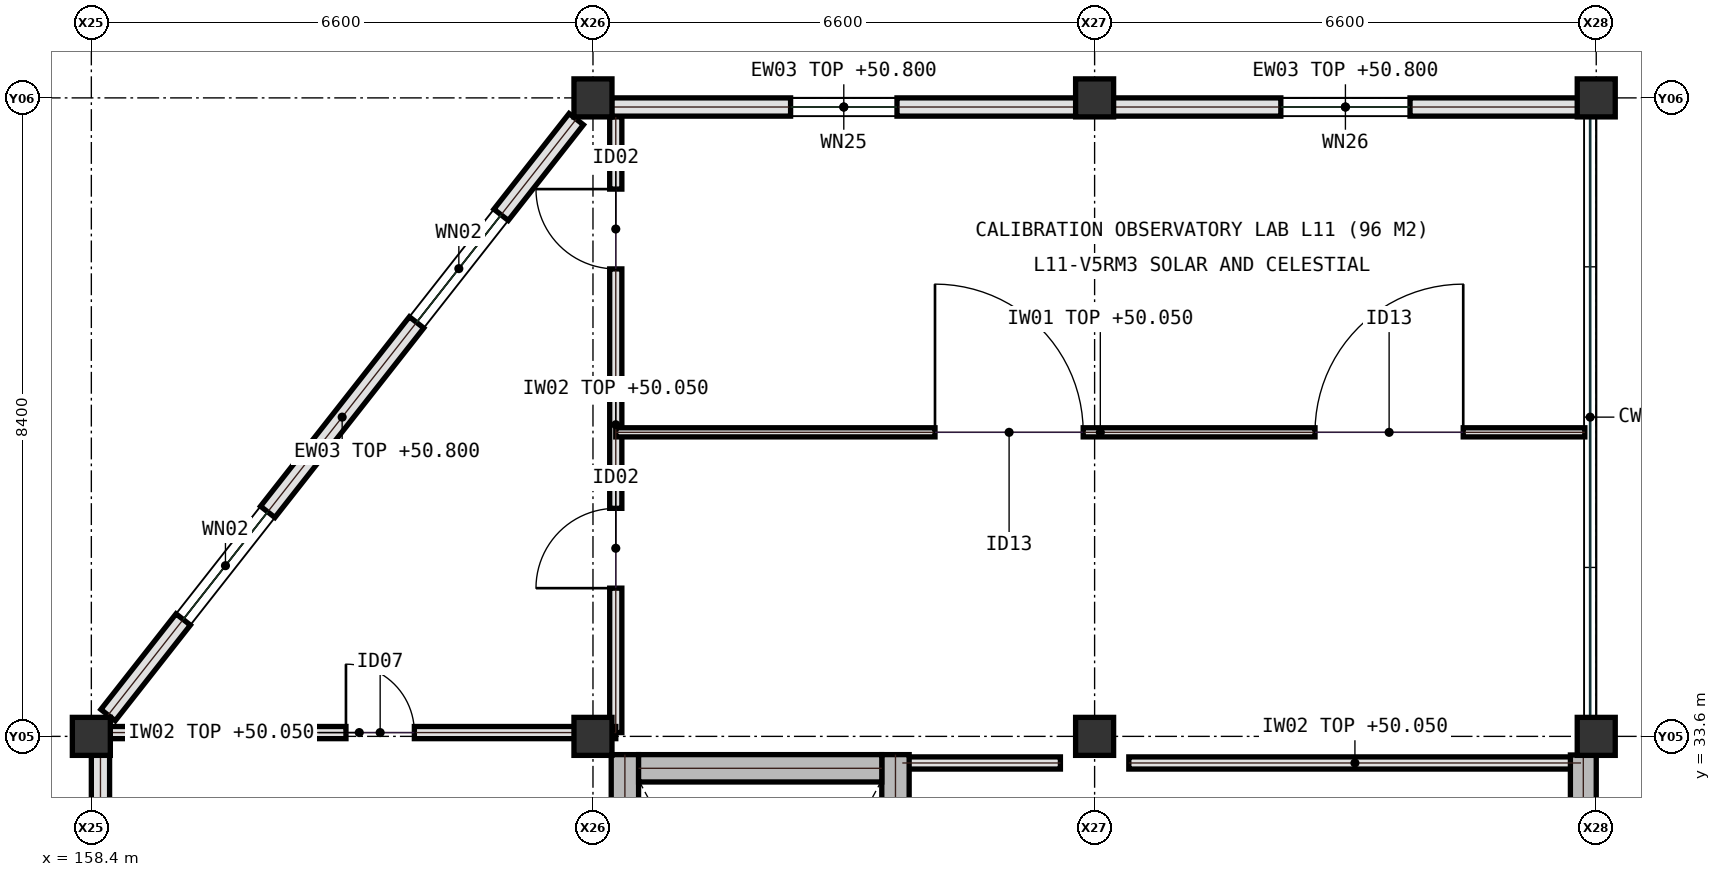
"""IFC4 building model, lengths in metres.
Left out: names, types, materials, properties, quantities, classifications, styles, units other than length and angle.
Written with IfcOpenShell. Run it as: python <this file> out.ifc"""

import sys

from ifc_helpers import new_model, si_unit, direction, frame, frame_2d, origin, origin_2d, place, context, subcontext, project, spatial, rectangle, extrude, element, fill, save


model = new_model("IFC4")
c1 = context("Model", 3, precision=1e-05, world=origin(), true_north=direction((0.0, 1.0)))
c2 = subcontext(c1, "Body", "Model", "MODEL_VIEW")
j1 = project(units=[si_unit("LENGTHUNIT", "METRE"), si_unit("PLANEANGLEUNIT", "RADIAN")], contexts=[c1])
p1 = place(None, origin())
s1 = spatial("IfcSite", under=j1, at=p1, CompositionType="ELEMENT")
p2 = place(p1, origin())
s2 = spatial("IfcBuilding", under=s1, at=p2, CompositionType="ELEMENT")
p3 = place(p2, frame((0.0, 0.0, 47.1)))
s3 = spatial("IfcBuildingStorey", under=s2, at=p3, CompositionType="ELEMENT", Elevation=47.1)
p4 = place(p3, frame((158.4, 33.6, 0.0), z_axis=(0.0, 0.0, 1.0), x_axis=(1.0, 0.0, 0.0)))
e1 = element("IfcColumn", 1, at=p4, inside=s3, PredefinedType="COLUMN", context=c2, shape_type="SweptSolid", body=[
    extrude(rectangle(XDim=0.5, YDim=0.5, at=origin_2d()), origin(), (0.0, 0.0, 1.0), 3.9),
])
p5 = place(p3, frame((165.0, 33.6, 0.0), z_axis=(0.0, 0.0, 1.0), x_axis=(1.0, 0.0, 0.0)))
e2 = element("IfcColumn", 2, at=p5, inside=s3, PredefinedType="COLUMN", context=c2, shape_type="SweptSolid", body=[
    extrude(rectangle(XDim=0.5, YDim=0.5, at=origin_2d()), origin(), (0.0, 0.0, 1.0), 4.54),
])
for number, where, z_axis, x_axis in (
    (3, (165.0, 42.0, 0.0), (0.0, 0.0, 1.0), (1.0, 0.0, 0.0)),
    (4, (171.6, 33.6, 0.0), (0.0, 0.0, 1.0), (1.0, 0.0, 0.0)),
    (5, (171.6, 42.0, 0.0), (0.0, 0.0, 1.0), (1.0, 0.0, 0.0)),
    (6, (178.2, 33.6, 0.0), (0.0, 0.0, 1.0), (1.0, 0.0, 0.0)),
    (7, (178.2, 42.0, 0.0), (0.0, 0.0, 1.0), (1.0, 0.0, 0.0)),
):
    element("IfcColumn", number, at=place(p3, frame(where, z_axis=z_axis, x_axis=x_axis)), inside=s3, PredefinedType="COLUMN", context=c2, shape_type="SweptSolid", body=[
        extrude(rectangle(XDim=0.5, YDim=0.5, at=origin_2d()), origin(), (0.0, 0.0, 1.0), 3.9),
    ])
p6 = place(p3, frame((165.3, 33.65, 0.0), z_axis=(0.0, 0.0, 1.0), x_axis=(0.0, 1.0, 0.0)))
e8 = element("IfcWall", 8, at=p6, inside=s3, PredefinedType="PARTITIONING", context=c2, shape_type="SweptSolid", body=[
    extrude(rectangle(XDim=8.1, YDim=0.16, at=frame_2d((4.05, 0.0))), origin(), (0.0, 0.0, 1.0), 2.95),
])
p7 = place(p6, frame((1.9, 0.0, 0.0)))
e9 = element("IfcOpeningElement", 9, at=p7, cuts=e8, PredefinedType="OPENING", context=c2, shape_type="SweptSolid", body=[
    extrude(rectangle(XDim=1.05, YDim=2.15, at=frame_2d((0.525, 1.075))), frame((0.0, 0.09, 0.0), z_axis=(0.0, -1.0, 0.0), x_axis=(1.0, 0.0, 0.0)), (0.0, 0.0, 1.0), 0.18),
])
p8 = place(p6, frame((6.1, 0.0, 0.0)))
e10 = element("IfcOpeningElement", 10, at=p8, cuts=e8, PredefinedType="OPENING", context=c2, shape_type="SweptSolid", body=[
    extrude(rectangle(XDim=1.05, YDim=2.15, at=frame_2d((0.525, 1.075))), frame((0.0, 0.09, 0.0), z_axis=(0.0, -1.0, 0.0), x_axis=(1.0, 0.0, 0.0)), (0.0, 0.0, 1.0), 0.18),
])
p9 = place(p3, frame((158.55, 33.65, 0.0), z_axis=(0.0, 0.0, 1.0), x_axis=(1.0, 0.0, 0.0)))
e11 = element("IfcWall", 11, at=p9, inside=s3, PredefinedType="PARTITIONING", context=c2, shape_type="SweptSolid", body=[
    extrude(rectangle(XDim=6.75, YDim=0.16, at=frame_2d((3.375, 0.0))), origin(), (0.0, 0.0, 1.0), 2.95),
])
p10 = place(p9, frame((3.2, 0.0, 0.0)))
e12 = element("IfcOpeningElement", 12, at=p10, cuts=e11, PredefinedType="OPENING", context=c2, shape_type="SweptSolid", body=[
    extrude(rectangle(XDim=0.9, YDim=2.1, at=frame_2d((0.45, 1.05))), frame((0.0, 0.09, 0.0), z_axis=(0.0, -1.0, 0.0), x_axis=(1.0, 0.0, 0.0)), (0.0, 0.0, 1.0), 0.18),
])
p11 = place(p3, frame((165.3, 37.6, 0.0), z_axis=(0.0, 0.0, 1.0), x_axis=(1.0, 0.0, 0.0)))
e13 = element("IfcWall", 13, at=p11, inside=s3, PredefinedType="PARTITIONING", context=c2, shape_type="SweptSolid", body=[
    extrude(rectangle(XDim=12.75, YDim=0.12, at=frame_2d((6.375, 0.0))), origin(), (0.0, 0.0, 1.0), 2.95),
])
p12 = place(p11, frame((4.2, 0.0, 0.0)))
e14 = element("IfcOpeningElement", 14, at=p12, cuts=e13, PredefinedType="OPENING", context=c2, shape_type="SweptSolid", body=[
    extrude(rectangle(XDim=1.95, YDim=2.35, at=frame_2d((0.975, 1.175))), frame((0.0, 0.07, 0.0), z_axis=(0.0, -1.0, 0.0), x_axis=(1.0, 0.0, 0.0)), (0.0, 0.0, 1.0), 0.14),
])
p13 = place(p11, frame((9.2, 0.0, 0.0)))
e15 = element("IfcOpeningElement", 15, at=p13, cuts=e13, PredefinedType="OPENING", context=c2, shape_type="SweptSolid", body=[
    extrude(rectangle(XDim=1.95, YDim=2.35, at=frame_2d((0.975, 1.175))), frame((0.0, 0.07, 0.0), z_axis=(0.0, -1.0, 0.0), x_axis=(1.0, 0.0, 0.0)), (0.0, 0.0, 1.0), 0.14),
])
p14 = place(p3, frame((169.07, 33.25, 0.0), z_axis=(0.0, 0.0, 1.0), x_axis=(1.0, 0.0, 0.0)))
e16 = element("IfcWall", 16, at=p14, inside=s3, PredefinedType="PARTITIONING", context=c2, shape_type="SweptSolid", body=[
    extrude(rectangle(XDim=2.08, YDim=0.16, at=frame_2d((1.04, 0.0))), origin(), (0.0, 0.0, 1.0), 2.95),
])
p15 = place(p3, frame((172.05, 33.25, 0.0), z_axis=(0.0, 0.0, 1.0), x_axis=(1.0, 0.0, 0.0)))
e17 = element("IfcWall", 17, at=p15, inside=s3, PredefinedType="PARTITIONING", context=c2, shape_type="SweptSolid", body=[
    extrude(rectangle(XDim=5.95, YDim=0.16, at=frame_2d((2.975, 0.0))), origin(), (0.0, 0.0, 1.0), 2.95),
])
p16 = place(p3, frame((158.52, 33.355, 0.0), z_axis=(0.0, 0.0, 1.0), x_axis=(0.0, -1.0, 0.0)))
e18 = element("IfcWall", 18, at=p16, inside=s3, PredefinedType="SOLIDWALL", context=c2, shape_type="SweptSolid", body=[
    extrude(rectangle(XDim=7.91, YDim=0.24, at=frame_2d((3.955, 0.0))), origin(), (0.0, 0.0, 1.0), 3.7),
])
p17 = place(p16, frame((3.155, 0.0, 0.95)))
e19 = element("IfcOpeningElement", 19, at=p17, cuts=e18, PredefinedType="OPENING", context=c2, shape_type="SweptSolid", body=[
    extrude(rectangle(XDim=1.6, YDim=1.85, at=frame_2d((0.8, 0.925))), frame((0.0, 0.13, 0.0), z_axis=(0.0, -1.0, 0.0), x_axis=(1.0, 0.0, 0.0)), (0.0, 0.0, 1.0), 0.26),
])
p18 = place(p3, frame((171.355, 41.88, 0.0), z_axis=(0.0, 0.0, 1.0), x_axis=(-1.0, 0.0, 0.0)))
e20 = element("IfcWall", 20, at=p18, inside=s3, PredefinedType="SOLIDWALL", context=c2, shape_type="SweptSolid", body=[
    extrude(rectangle(XDim=6.11, YDim=0.24, at=frame_2d((3.055, 0.0))), origin(), (0.0, 0.0, 1.0), 3.7),
])
p19 = place(p18, frame((2.355, 0.0, 0.95)))
e21 = element("IfcOpeningElement", 21, at=p19, cuts=e20, PredefinedType="OPENING", context=c2, shape_type="SweptSolid", body=[
    extrude(rectangle(XDim=1.4, YDim=1.95, at=frame_2d((0.7, 0.975))), frame((0.0, 0.13, 0.0), z_axis=(0.0, -1.0, 0.0), x_axis=(1.0, 0.0, 0.0)), (0.0, 0.0, 1.0), 0.26),
])
p20 = place(p3, frame((178.03, 25.445, 0.0), z_axis=(0.0, 0.0, 1.0), x_axis=(0.0, 1.0, 0.0)))
e22 = element("IfcWall", 22, at=p20, inside=s3, PredefinedType="SHEAR", context=c2, shape_type="SweptSolid", body=[
    extrude(rectangle(XDim=7.91, YDim=0.34, at=frame_2d((3.955, 0.0))), origin(), (0.0, 0.0, 1.0), 3.7),
])
p21 = place(p3, frame((177.955, 41.88, 0.0), z_axis=(0.0, 0.0, 1.0), x_axis=(-1.0, 0.0, 0.0)))
e23 = element("IfcWall", 23, at=p21, inside=s3, PredefinedType="SOLIDWALL", context=c2, shape_type="SweptSolid", body=[
    extrude(rectangle(XDim=6.11, YDim=0.24, at=frame_2d((3.055, 0.0))), origin(), (0.0, 0.0, 1.0), 3.7),
])
p22 = place(p21, frame((2.205, 0.0, 0.95)))
e24 = element("IfcOpeningElement", 24, at=p22, cuts=e23, PredefinedType="OPENING", context=c2, shape_type="SweptSolid", body=[
    extrude(rectangle(XDim=1.7, YDim=1.95, at=frame_2d((0.85, 0.975))), frame((0.0, 0.13, 0.0), z_axis=(0.0, -1.0, 0.0), x_axis=(1.0, 0.0, 0.0)), (0.0, 0.0, 1.0), 0.26),
])
p23 = place(p3, frame((158.62, 33.88, 0.0), z_axis=(0.0, 0.0, 1.0), x_axis=(0.617811819191, 0.786325985878, 0.0)))
e25 = element("IfcWall", 25, at=p23, inside=s3, PredefinedType="SOLIDWALL", context=c2, shape_type="SweptSolid", body=[
    extrude(rectangle(XDim=9.97, YDim=0.24, at=frame_2d((4.985, 0.0))), origin(), (0.0, 0.0, 1.0), 3.7),
])
p24 = place(p23, frame((1.6, 0.0, 0.95)))
e26 = element("IfcOpeningElement", 26, at=p24, cuts=e25, PredefinedType="OPENING", context=c2, shape_type="SweptSolid", body=[
    extrude(rectangle(XDim=1.8, YDim=1.6, at=frame_2d((0.9, 0.8))), frame((0.0, 0.13, 0.0), z_axis=(0.0, -1.0, 0.0), x_axis=(1.0, 0.0, 0.0)), (0.0, 0.0, 1.0), 0.26),
])
p25 = place(p23, frame((6.57, 0.0, 0.95)))
e27 = element("IfcOpeningElement", 27, at=p25, cuts=e25, PredefinedType="OPENING", context=c2, shape_type="SweptSolid", body=[
    extrude(rectangle(XDim=1.8, YDim=1.6, at=frame_2d((0.9, 0.8))), frame((0.0, 0.13, 0.0), z_axis=(0.0, -1.0, 0.0), x_axis=(1.0, 0.0, 0.0)), (0.0, 0.0, 1.0), 0.26),
])
p26 = place(p3, frame((165.42, 25.19, 0.0), z_axis=(0.0, 0.0, 1.0), x_axis=(0.0, 1.0, 0.0)))
e28 = element("IfcWall", 28, at=p26, inside=s3, PredefinedType="SHEAR", context=c2, shape_type="SweptSolid", body=[
    extrude(rectangle(XDim=8.17, YDim=0.36, at=frame_2d((4.085, 0.0))), origin(), (0.0, 0.0, 1.0), 3.7),
])
p27 = place(p3, frame((168.98, 25.19, 0.0), z_axis=(0.0, 0.0, 1.0), x_axis=(0.0, 1.0, 0.0)))
e29 = element("IfcWall", 29, at=p27, inside=s3, PredefinedType="SHEAR", context=c2, shape_type="SweptSolid", body=[
    extrude(rectangle(XDim=8.17, YDim=0.36, at=frame_2d((4.085, 0.0))), origin(), (0.0, 0.0, 1.0), 3.7),
])
p28 = place(p27, frame((0.45, 0.0, 0.0)))
e30 = element("IfcOpeningElement", 30, at=p28, cuts=e29, PredefinedType="OPENING", context=c2, shape_type="SweptSolid", body=[
    extrude(rectangle(XDim=1.25, YDim=2.15, at=frame_2d((0.625, 1.075))), frame((0.0, 0.19, 0.0), z_axis=(0.0, -1.0, 0.0), x_axis=(1.0, 0.0, 0.0)), (0.0, 0.0, 1.0), 0.38),
])
p29 = place(p3, frame((165.6, 33.18, 0.0), z_axis=(0.0, 0.0, 1.0), x_axis=(1.0, 0.0, 0.0)))
e31 = element("IfcWall", 31, at=p29, inside=s3, PredefinedType="SHEAR", context=c2, shape_type="SweptSolid", body=[
    extrude(rectangle(XDim=3.2, YDim=0.36, at=frame_2d((1.6, 0.0))), origin(), (0.0, 0.0, 1.0), 3.7),
])
p30 = place(p7, origin())
e32 = element("IfcDoor", 32, at=p30, inside=s3, OperationType="SINGLE_SWING_LEFT", PredefinedType="DOOR", context=c2, shape_type="SweptSolid", body=[
    extrude(rectangle(XDim=1.05, YDim=2.15, at=frame_2d((0.525, 1.075))), frame((0.0, 0.025, 0.0), z_axis=(0.0, -1.0, 0.0), x_axis=(1.0, 0.0, 0.0)), (0.0, 0.0, 1.0), 0.05),
])
fill(e9, e32)
p31 = place(p8, origin())
e33 = element("IfcDoor", 33, at=p31, inside=s3, OperationType="SINGLE_SWING_RIGHT", PredefinedType="DOOR", context=c2, shape_type="SweptSolid", body=[
    extrude(rectangle(XDim=1.05, YDim=2.15, at=frame_2d((0.525, 1.075))), frame((0.0, 0.025, 0.0), z_axis=(0.0, -1.0, 0.0), x_axis=(1.0, 0.0, 0.0)), (0.0, 0.0, 1.0), 0.05),
])
fill(e10, e33)
p32 = place(p10, origin())
e34 = element("IfcDoor", 34, at=p32, inside=s3, OperationType="SINGLE_SWING_LEFT", PredefinedType="DOOR", context=c2, shape_type="SweptSolid", body=[
    extrude(rectangle(XDim=0.9, YDim=2.1, at=frame_2d((0.45, 1.05))), frame((0.0, 0.025, 0.0), z_axis=(0.0, -1.0, 0.0), x_axis=(1.0, 0.0, 0.0)), (0.0, 0.0, 1.0), 0.05),
])
fill(e12, e34)
p33 = place(p12, origin())
e35 = element("IfcDoor", 35, at=p33, inside=s3, OperationType="SINGLE_SWING_LEFT", PredefinedType="DOOR", context=c2, shape_type="SweptSolid", body=[
    extrude(rectangle(XDim=1.95, YDim=2.35, at=frame_2d((0.975, 1.175))), frame((0.0, 0.025, 0.0), z_axis=(0.0, -1.0, 0.0), x_axis=(1.0, 0.0, 0.0)), (0.0, 0.0, 1.0), 0.05),
])
fill(e14, e35)
p34 = place(p13, origin())
e36 = element("IfcDoor", 36, at=p34, inside=s3, OperationType="SINGLE_SWING_RIGHT", PredefinedType="DOOR", context=c2, shape_type="SweptSolid", body=[
    extrude(rectangle(XDim=1.95, YDim=2.35, at=frame_2d((0.975, 1.175))), frame((0.0, 0.025, 0.0), z_axis=(0.0, -1.0, 0.0), x_axis=(1.0, 0.0, 0.0)), (0.0, 0.0, 1.0), 0.05),
])
fill(e15, e36)
p35 = place(p19, origin())
e37 = element("IfcWindow", 37, at=p35, inside=s3, PartitioningType="SINGLE_PANEL", PredefinedType="WINDOW", context=c2, shape_type="SweptSolid", body=[
    extrude(rectangle(XDim=1.4, YDim=1.95, at=frame_2d((0.7, 0.975))), frame((0.0, 0.03, 0.0), z_axis=(0.0, -1.0, 0.0), x_axis=(1.0, 0.0, 0.0)), (0.0, 0.0, 1.0), 0.06),
])
fill(e21, e37)
p36 = place(p22, origin())
e38 = element("IfcWindow", 38, at=p36, inside=s3, PartitioningType="SINGLE_PANEL", PredefinedType="WINDOW", context=c2, shape_type="SweptSolid", body=[
    extrude(rectangle(XDim=1.7, YDim=1.95, at=frame_2d((0.85, 0.975))), frame((0.0, 0.03, 0.0), z_axis=(0.0, -1.0, 0.0), x_axis=(1.0, 0.0, 0.0)), (0.0, 0.0, 1.0), 0.06),
])
fill(e24, e38)
p37 = place(p24, origin())
e39 = element("IfcWindow", 39, at=p37, inside=s3, PartitioningType="SINGLE_PANEL", PredefinedType="WINDOW", context=c2, shape_type="SweptSolid", body=[
    extrude(rectangle(XDim=1.8, YDim=1.6, at=frame_2d((0.9, 0.8))), frame((0.0, 0.03, 0.0), z_axis=(0.0, -1.0, 0.0), x_axis=(1.0, 0.0, 0.0)), (0.0, 0.0, 1.0), 0.06),
])
fill(e26, e39)
p38 = place(p25, origin())
e40 = element("IfcWindow", 40, at=p38, inside=s3, PartitioningType="SINGLE_PANEL", PredefinedType="WINDOW", context=c2, shape_type="SweptSolid", body=[
    extrude(rectangle(XDim=1.8, YDim=1.6, at=frame_2d((0.9, 0.8))), frame((0.0, 0.03, 0.0), z_axis=(0.0, -1.0, 0.0), x_axis=(1.0, 0.0, 0.0)), (0.0, 0.0, 1.0), 0.06),
])
fill(e27, e40)
save(model, sys.argv[1])
